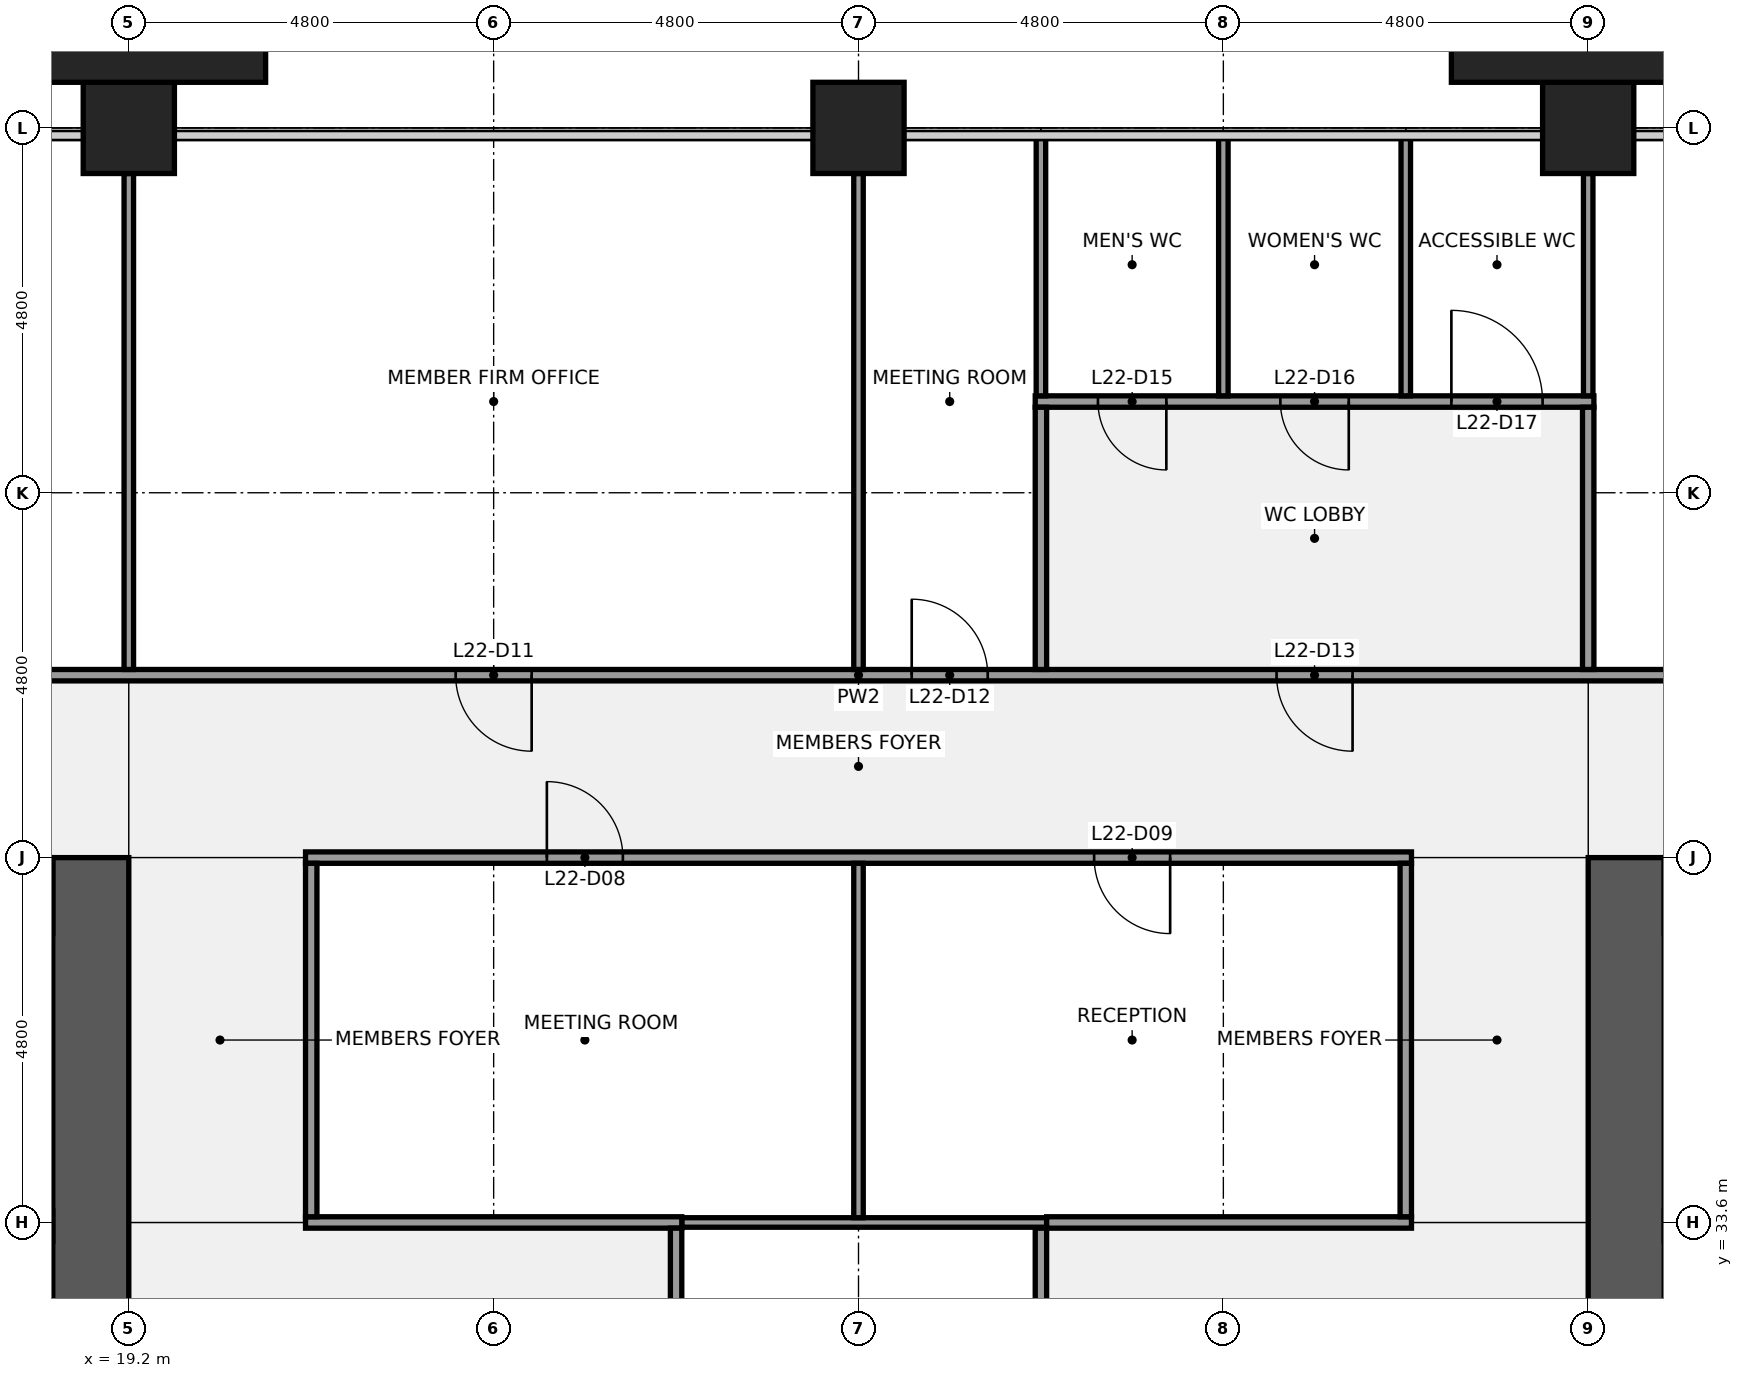
"""IFC4 building model, lengths in metres.
Left out: names, types, materials, properties, quantities, classifications, styles, units other than length and angle.
Written with IfcOpenShell. Run it as: python <this file> out.ifc"""

import sys

from ifc_helpers import new_model, si_unit, direction, frame, frame_2d, origin, origin_2d, place, context, subcontext, project, spatial, rectangle, extrude, element, fill, save


model = new_model("IFC4")
c1 = context("Model", 3, precision=1e-05, world=origin(), true_north=direction((0.0, 1.0)))
c2 = subcontext(c1, "Body", "Model", "MODEL_VIEW")
j1 = project(units=[si_unit("LENGTHUNIT", "METRE"), si_unit("PLANEANGLEUNIT", "RADIAN")], contexts=[c1])
p1 = place(None, origin())
s1 = spatial("IfcSite", under=j1, at=p1, CompositionType="ELEMENT")
p2 = place(p1, origin())
s2 = spatial("IfcBuilding", under=s1, at=p2, CompositionType="ELEMENT")
p3 = place(p2, frame((0.0, 0.0, 108.1)))
s3 = spatial("IfcBuildingStorey", under=s2, at=p3, CompositionType="ELEMENT", Elevation=108.1)
for number, where, z_axis, x_axis in (
    (1, (19.2, 48.0, 0.0), (0.0, 0.0, 1.0), (1.0, 0.0, 0.0)),
    (2, (28.8, 48.0, 0.0), (0.0, 0.0, 1.0), (1.0, 0.0, 0.0)),
    (3, (38.4, 48.0, 0.0), (0.0, 0.0, 1.0), (1.0, 0.0, 0.0)),
):
    element("IfcColumn", number, at=place(p3, frame(where, z_axis=z_axis, x_axis=x_axis)), inside=s3, PredefinedType="COLUMN", context=c2, shape_type="SweptSolid", body=[
        extrude(rectangle(XDim=1.2, YDim=1.2, at=origin_2d()), origin(), (0.0, 0.0, 1.0), 4.0),
    ])
p4 = place(p3, frame((18.7, 38.4, 0.0), z_axis=(0.0, 0.0, 1.0), x_axis=(0.0, -1.0, 0.0)))
e4 = element("IfcWall", 4, at=p4, inside=s3, PredefinedType="SHEAR", context=c2, shape_type="SweptSolid", body=[
    extrude(rectangle(XDim=28.8, YDim=1.0, at=frame_2d((14.4, 0.0))), origin(), (0.0, 0.0, 1.0), 3.84),
])
p5 = place(p4, frame((18.3, 0.0, 0.0)))
e5 = element("IfcOpeningElement", 5, at=p5, cuts=e4, PredefinedType="OPENING", context=c2, shape_type="SweptSolid", body=[
    extrude(rectangle(XDim=1.8, YDim=2.1, at=frame_2d((0.9, 1.05))), frame((0.0, 0.51, 0.0), z_axis=(0.0, -1.0, 0.0), x_axis=(1.0, 0.0, 0.0)), (0.0, 0.0, 1.0), 1.02),
])
p6 = place(p4, frame((8.7, 0.0, 0.0)))
e6 = element("IfcOpeningElement", 6, at=p6, cuts=e4, PredefinedType="OPENING", context=c2, shape_type="SweptSolid", body=[
    extrude(rectangle(XDim=1.8, YDim=2.1, at=frame_2d((0.9, 1.05))), frame((0.0, 0.51, 0.0), z_axis=(0.0, -1.0, 0.0), x_axis=(1.0, 0.0, 0.0)), (0.0, 0.0, 1.0), 1.02),
])
p7 = place(p3, frame((1.0, 33.55, 0.0), z_axis=(0.0, 0.0, 1.0), x_axis=(1.0, 0.0, 0.0)))
e7 = element("IfcWall", 7, at=p7, inside=s3, PredefinedType="SHEAR", context=c2, shape_type="SweptSolid", body=[
    extrude(rectangle(XDim=17.2, YDim=0.4, at=frame_2d((8.6, 0.0))), origin(), (0.0, 0.0, 1.0), 3.84),
])
p8 = place(p3, frame((38.9, 9.6, 0.0), z_axis=(0.0, 0.0, 1.0), x_axis=(0.0, 1.0, 0.0)))
e8 = element("IfcWall", 8, at=p8, inside=s3, PredefinedType="SHEAR", context=c2, shape_type="SweptSolid", body=[
    extrude(rectangle(XDim=28.8, YDim=1.0, at=frame_2d((14.4, 0.0))), origin(), (0.0, 0.0, 1.0), 3.84),
])
p9 = place(p8, frame((8.7, 0.0, 0.0)))
e9 = element("IfcOpeningElement", 9, at=p9, cuts=e8, PredefinedType="OPENING", context=c2, shape_type="SweptSolid", body=[
    extrude(rectangle(XDim=1.8, YDim=2.1, at=frame_2d((0.9, 1.05))), frame((0.0, 0.51, 0.0), z_axis=(0.0, -1.0, 0.0), x_axis=(1.0, 0.0, 0.0)), (0.0, 0.0, 1.0), 1.02),
])
p10 = place(p8, frame((18.3, 0.0, 0.0)))
e10 = element("IfcOpeningElement", 10, at=p10, cuts=e8, PredefinedType="OPENING", context=c2, shape_type="SweptSolid", body=[
    extrude(rectangle(XDim=1.8, YDim=2.1, at=frame_2d((0.9, 1.05))), frame((0.0, 0.51, 0.0), z_axis=(0.0, -1.0, 0.0), x_axis=(1.0, 0.0, 0.0)), (0.0, 0.0, 1.0), 1.02),
])
p11 = place(p3, frame((26.475, 33.6, 0.0), z_axis=(0.0, 0.0, 1.0), x_axis=(1.0, 0.0, 0.0)))
e11 = element("IfcWall", 11, at=p11, inside=s3, PredefinedType="PARTITIONING", context=c2, shape_type="SweptSolid", body=[
    extrude(rectangle(XDim=4.8, YDim=0.125, at=frame_2d((2.4, 0.0))), origin(), (0.0, 0.0, 1.0), 2.936),
])
p12 = place(p3, frame((21.525, 33.6, 0.0), z_axis=(0.0, 0.0, 1.0), x_axis=(1.0, 0.0, 0.0)))
e12 = element("IfcWall", 12, at=p12, inside=s3, PredefinedType="PARTITIONING", context=c2, shape_type="SweptSolid", body=[
    extrude(rectangle(XDim=4.95, YDim=0.15, at=frame_2d((2.475, 0.0))), origin(), (0.0, 0.0, 1.0), 2.936),
])
p13 = place(p3, frame((31.275, 33.6, 0.0), z_axis=(0.0, 0.0, 1.0), x_axis=(1.0, 0.0, 0.0)))
e13 = element("IfcWall", 13, at=p13, inside=s3, PredefinedType="PARTITIONING", context=c2, shape_type="SweptSolid", body=[
    extrude(rectangle(XDim=4.8, YDim=0.15, at=frame_2d((2.4, 0.0))), origin(), (0.0, 0.0, 1.0), 2.936),
])
p14 = place(p3, frame((21.525, 38.4, 0.0), z_axis=(0.0, 0.0, 1.0), x_axis=(1.0, 0.0, 0.0)))
e14 = element("IfcWall", 14, at=p14, inside=s3, PredefinedType="PARTITIONING", context=c2, shape_type="SweptSolid", body=[
    extrude(rectangle(XDim=14.55, YDim=0.15, at=frame_2d((7.275, 0.0))), origin(), (0.0, 0.0, 1.0), 2.936),
])
p15 = place(p14, frame((3.175, 0.0, 0.0)))
e15 = element("IfcOpeningElement", 15, at=p15, cuts=e14, PredefinedType="OPENING", context=c2, shape_type="SweptSolid", body=[
    extrude(rectangle(XDim=1.0, YDim=2.1, at=frame_2d((0.5, 1.05))), frame((0.0, 0.085, 0.0), z_axis=(0.0, -1.0, 0.0), x_axis=(1.0, 0.0, 0.0)), (0.0, 0.0, 1.0), 0.17),
])
p16 = place(p14, frame((10.375, 0.0, 0.0)))
e16 = element("IfcOpeningElement", 16, at=p16, cuts=e14, PredefinedType="OPENING", context=c2, shape_type="SweptSolid", body=[
    extrude(rectangle(XDim=1.0, YDim=2.1, at=frame_2d((0.5, 1.05))), frame((0.0, 0.085, 0.0), z_axis=(0.0, -1.0, 0.0), x_axis=(1.0, 0.0, 0.0)), (0.0, 0.0, 1.0), 0.17),
])
p17 = place(p3, frame((9.525, 40.8, 0.0), z_axis=(0.0, 0.0, 1.0), x_axis=(1.0, 0.0, 0.0)))
e17 = element("IfcWall", 17, at=p17, inside=s3, PredefinedType="PARTITIONING", context=c2, shape_type="SweptSolid", body=[
    extrude(rectangle(XDim=38.55, YDim=0.15, at=frame_2d((19.275, 0.0))), origin(), (0.0, 0.0, 1.0), 2.936),
])
p18 = place(p17, frame((4.375, 0.0, 0.0)))
e18 = element("IfcOpeningElement", 18, at=p18, cuts=e17, PredefinedType="OPENING", context=c2, shape_type="SweptSolid", body=[
    extrude(rectangle(XDim=1.0, YDim=2.1, at=frame_2d((0.5, 1.05))), frame((0.0, 0.085, 0.0), z_axis=(0.0, -1.0, 0.0), x_axis=(1.0, 0.0, 0.0)), (0.0, 0.0, 1.0), 0.17),
])
p19 = place(p17, frame((13.975, 0.0, 0.0)))
e19 = element("IfcOpeningElement", 19, at=p19, cuts=e17, PredefinedType="OPENING", context=c2, shape_type="SweptSolid", body=[
    extrude(rectangle(XDim=1.0, YDim=2.1, at=frame_2d((0.5, 1.05))), frame((0.0, 0.085, 0.0), z_axis=(0.0, -1.0, 0.0), x_axis=(1.0, 0.0, 0.0)), (0.0, 0.0, 1.0), 0.17),
])
p20 = place(p17, frame((19.975, 0.0, 0.0)))
e20 = element("IfcOpeningElement", 20, at=p20, cuts=e17, PredefinedType="OPENING", context=c2, shape_type="SweptSolid", body=[
    extrude(rectangle(XDim=1.0, YDim=2.1, at=frame_2d((0.5, 1.05))), frame((0.0, 0.085, 0.0), z_axis=(0.0, -1.0, 0.0), x_axis=(1.0, 0.0, 0.0)), (0.0, 0.0, 1.0), 0.17),
])
p21 = place(p17, frame((24.775, 0.0, 0.0)))
e21 = element("IfcOpeningElement", 21, at=p21, cuts=e17, PredefinedType="OPENING", context=c2, shape_type="SweptSolid", body=[
    extrude(rectangle(XDim=1.0, YDim=2.1, at=frame_2d((0.5, 1.05))), frame((0.0, 0.085, 0.0), z_axis=(0.0, -1.0, 0.0), x_axis=(1.0, 0.0, 0.0)), (0.0, 0.0, 1.0), 0.17),
])
p22 = place(p17, frame((33.175, 0.0, 0.0)))
e22 = element("IfcOpeningElement", 22, at=p22, cuts=e17, PredefinedType="OPENING", context=c2, shape_type="SweptSolid", body=[
    extrude(rectangle(XDim=1.0, YDim=2.1, at=frame_2d((0.5, 1.05))), frame((0.0, 0.085, 0.0), z_axis=(0.0, -1.0, 0.0), x_axis=(1.0, 0.0, 0.0)), (0.0, 0.0, 1.0), 0.17),
])
p23 = place(p3, frame((31.125, 44.4, 0.0), z_axis=(0.0, 0.0, 1.0), x_axis=(1.0, 0.0, 0.0)))
e23 = element("IfcWall", 23, at=p23, inside=s3, PredefinedType="PARTITIONING", context=c2, shape_type="SweptSolid", body=[
    extrude(rectangle(XDim=7.35, YDim=0.15, at=frame_2d((3.675, 0.0))), origin(), (0.0, 0.0, 1.0), 2.936),
])
p24 = place(p23, frame((0.825, 0.0, 0.0)))
e24 = element("IfcOpeningElement", 24, at=p24, cuts=e23, PredefinedType="OPENING", context=c2, shape_type="SweptSolid", body=[
    extrude(rectangle(XDim=0.9, YDim=2.1, at=frame_2d((0.45, 1.05))), frame((0.0, 0.085, 0.0), z_axis=(0.0, -1.0, 0.0), x_axis=(1.0, 0.0, 0.0)), (0.0, 0.0, 1.0), 0.17),
])
p25 = place(p23, frame((3.225, 0.0, 0.0)))
e25 = element("IfcOpeningElement", 25, at=p25, cuts=e23, PredefinedType="OPENING", context=c2, shape_type="SweptSolid", body=[
    extrude(rectangle(XDim=0.9, YDim=2.1, at=frame_2d((0.45, 1.05))), frame((0.0, 0.085, 0.0), z_axis=(0.0, -1.0, 0.0), x_axis=(1.0, 0.0, 0.0)), (0.0, 0.0, 1.0), 0.17),
])
p26 = place(p23, frame((5.475, 0.0, 0.0)))
e26 = element("IfcOpeningElement", 26, at=p26, cuts=e23, PredefinedType="OPENING", context=c2, shape_type="SweptSolid", body=[
    extrude(rectangle(XDim=1.2, YDim=2.1, at=frame_2d((0.6, 1.05))), frame((0.0, 0.085, 0.0), z_axis=(0.0, -1.0, 0.0), x_axis=(1.0, 0.0, 0.0)), (0.0, 0.0, 1.0), 0.17),
])
p27 = place(p3, frame((19.2, 40.875, 0.0), z_axis=(0.0, 0.0, 1.0), x_axis=(0.0, 1.0, 0.0)))
e27 = element("IfcWall", 27, at=p27, inside=s3, PredefinedType="PARTITIONING", context=c2, shape_type="SweptSolid", body=[
    extrude(rectangle(XDim=6.525, YDim=0.125, at=frame_2d((3.262, 0.0))), origin(), (0.0, 0.0, 1.0), 2.936),
])
p28 = place(p3, frame((21.6, 33.675, 0.0), z_axis=(0.0, 0.0, 1.0), x_axis=(0.0, 1.0, 0.0)))
e28 = element("IfcWall", 28, at=p28, inside=s3, PredefinedType="PARTITIONING", context=c2, shape_type="SweptSolid", body=[
    extrude(rectangle(XDim=4.65, YDim=0.15, at=frame_2d((2.325, 0.0))), origin(), (0.0, 0.0, 1.0), 2.936),
])
p29 = place(p3, frame((26.4, 20.475, 0.0), z_axis=(0.0, 0.0, 1.0), x_axis=(0.0, 1.0, 0.0)))
e29 = element("IfcWall", 29, at=p29, inside=s3, PredefinedType="PARTITIONING", context=c2, shape_type="SweptSolid", body=[
    extrude(rectangle(XDim=13.05, YDim=0.15, at=frame_2d((6.525, 0.0))), origin(), (0.0, 0.0, 1.0), 2.936),
])
p30 = place(p29, frame((6.025, 0.0, 0.0)))
e30 = element("IfcOpeningElement", 30, at=p30, cuts=e29, PredefinedType="OPENING", context=c2, shape_type="SweptSolid", body=[
    extrude(rectangle(XDim=1.0, YDim=2.1, at=frame_2d((0.5, 1.05))), frame((0.0, 0.085, 0.0), z_axis=(0.0, -1.0, 0.0), x_axis=(1.0, 0.0, 0.0)), (0.0, 0.0, 1.0), 0.17),
])
p31 = place(p3, frame((28.8, 33.663, 0.0), z_axis=(0.0, 0.0, 1.0), x_axis=(0.0, 1.0, 0.0)))
e31 = element("IfcWall", 31, at=p31, inside=s3, PredefinedType="PARTITIONING", context=c2, shape_type="SweptSolid", body=[
    extrude(rectangle(XDim=4.662, YDim=0.125, at=frame_2d((2.331, 0.0))), origin(), (0.0, 0.0, 1.0), 2.936),
])
p32 = place(p3, frame((28.8, 40.875, 0.0), z_axis=(0.0, 0.0, 1.0), x_axis=(0.0, 1.0, 0.0)))
e32 = element("IfcWall", 32, at=p32, inside=s3, PredefinedType="PARTITIONING", context=c2, shape_type="SweptSolid", body=[
    extrude(rectangle(XDim=6.525, YDim=0.125, at=frame_2d((3.262, 0.0))), origin(), (0.0, 0.0, 1.0), 2.936),
])
p33 = place(p3, frame((31.2, 44.475, 0.0), z_axis=(0.0, 0.0, 1.0), x_axis=(0.0, 1.0, 0.0)))
e33 = element("IfcWall", 33, at=p33, inside=s3, PredefinedType="PARTITIONING", context=c2, shape_type="SweptSolid", body=[
    extrude(rectangle(XDim=3.425, YDim=0.125, at=frame_2d((1.712, 0.0))), origin(), (0.0, 0.0, 1.0), 2.936),
])
p34 = place(p3, frame((31.2, 20.475, 0.0), z_axis=(0.0, 0.0, 1.0), x_axis=(0.0, 1.0, 0.0)))
e34 = element("IfcWall", 34, at=p34, inside=s3, PredefinedType="PARTITIONING", context=c2, shape_type="SweptSolid", body=[
    extrude(rectangle(XDim=13.05, YDim=0.15, at=frame_2d((6.525, 0.0))), origin(), (0.0, 0.0, 1.0), 2.936),
])
p35 = place(p3, frame((31.2, 40.875, 0.0), z_axis=(0.0, 0.0, 1.0), x_axis=(0.0, 1.0, 0.0)))
e35 = element("IfcWall", 35, at=p35, inside=s3, PredefinedType="PARTITIONING", context=c2, shape_type="SweptSolid", body=[
    extrude(rectangle(XDim=3.45, YDim=0.15, at=frame_2d((1.725, 0.0))), origin(), (0.0, 0.0, 1.0), 2.936),
])
for number, where, z_axis, x_axis in (
    (36, (33.6, 44.475, 0.0), (0.0, 0.0, 1.0), (0.0, 1.0, 0.0)),
    (37, (36.0, 44.475, 0.0), (0.0, 0.0, 1.0), (0.0, 1.0, 0.0)),
):
    element("IfcWall", number, at=place(p3, frame(where, z_axis=z_axis, x_axis=x_axis)), inside=s3, PredefinedType="PARTITIONING", context=c2, shape_type="SweptSolid", body=[
        extrude(rectangle(XDim=3.425, YDim=0.125, at=frame_2d((1.712, 0.0))), origin(), (0.0, 0.0, 1.0), 2.936),
    ])
p36 = place(p3, frame((36.0, 33.675, 0.0), z_axis=(0.0, 0.0, 1.0), x_axis=(0.0, 1.0, 0.0)))
e38 = element("IfcWall", 38, at=p36, inside=s3, PredefinedType="PARTITIONING", context=c2, shape_type="SweptSolid", body=[
    extrude(rectangle(XDim=4.65, YDim=0.15, at=frame_2d((2.325, 0.0))), origin(), (0.0, 0.0, 1.0), 2.936),
])
p37 = place(p3, frame((38.4, 44.475, 0.0), z_axis=(0.0, 0.0, 1.0), x_axis=(0.0, 1.0, 0.0)))
e39 = element("IfcWall", 39, at=p37, inside=s3, PredefinedType="PARTITIONING", context=c2, shape_type="SweptSolid", body=[
    extrude(rectangle(XDim=2.925, YDim=0.125, at=frame_2d((1.462, 0.0))), origin(), (0.0, 0.0, 1.0), 2.936),
])
p38 = place(p3, frame((38.4, 40.875, 0.0), z_axis=(0.0, 0.0, 1.0), x_axis=(0.0, 1.0, 0.0)))
e40 = element("IfcWall", 40, at=p38, inside=s3, PredefinedType="PARTITIONING", context=c2, shape_type="SweptSolid", body=[
    extrude(rectangle(XDim=3.45, YDim=0.15, at=frame_2d((1.725, 0.0))), origin(), (0.0, 0.0, 1.0), 2.936),
])
for number, where, z_axis, x_axis in (
    (41, (19.2, 49.05, 0.0), (0.0, 0.0, 1.0), (1.0, 0.0, 0.0)),
    (42, (38.4, 49.05, 0.0), (0.0, 0.0, 1.0), (1.0, 0.0, 0.0)),
):
    element("IfcColumn", number, at=place(p3, frame(where, z_axis=z_axis, x_axis=x_axis)), inside=s3, PredefinedType="PILASTER", context=c2, shape_type="SweptSolid", body=[
        extrude(rectangle(XDim=3.6, YDim=0.9, at=origin_2d()), origin(), (0.0, 0.0, 1.0), 4.0),
    ])
p39 = place(p15, origin())
e43 = element("IfcDoor", 43, at=p39, inside=s3, OperationType="SINGLE_SWING_LEFT", PredefinedType="DOOR", context=c2, shape_type="SweptSolid", body=[
    extrude(rectangle(XDim=1.0, YDim=2.1, at=frame_2d((0.5, 1.05))), frame((0.0, 0.025, 0.0), z_axis=(0.0, -1.0, 0.0), x_axis=(1.0, 0.0, 0.0)), (0.0, 0.0, 1.0), 0.05),
])
fill(e15, e43)
p40 = place(p16, origin())
e44 = element("IfcDoor", 44, at=p40, inside=s3, OperationType="SINGLE_SWING_RIGHT", PredefinedType="DOOR", context=c2, shape_type="SweptSolid", body=[
    extrude(rectangle(XDim=1.0, YDim=2.1, at=frame_2d((0.5, 1.05))), frame((0.0, 0.025, 0.0), z_axis=(0.0, -1.0, 0.0), x_axis=(1.0, 0.0, 0.0)), (0.0, 0.0, 1.0), 0.05),
])
fill(e16, e44)
p41 = place(p19, origin())
e45 = element("IfcDoor", 45, at=p41, inside=s3, OperationType="SINGLE_SWING_RIGHT", PredefinedType="DOOR", context=c2, shape_type="SweptSolid", body=[
    extrude(rectangle(XDim=1.0, YDim=2.1, at=frame_2d((0.5, 1.05))), frame((0.0, 0.025, 0.0), z_axis=(0.0, -1.0, 0.0), x_axis=(1.0, 0.0, 0.0)), (0.0, 0.0, 1.0), 0.05),
])
fill(e19, e45)
p42 = place(p20, origin())
e46 = element("IfcDoor", 46, at=p42, inside=s3, OperationType="SINGLE_SWING_LEFT", PredefinedType="DOOR", context=c2, shape_type="SweptSolid", body=[
    extrude(rectangle(XDim=1.0, YDim=2.1, at=frame_2d((0.5, 1.05))), frame((0.0, 0.025, 0.0), z_axis=(0.0, -1.0, 0.0), x_axis=(1.0, 0.0, 0.0)), (0.0, 0.0, 1.0), 0.05),
])
fill(e20, e46)
p43 = place(p21, origin())
e47 = element("IfcDoor", 47, at=p43, inside=s3, OperationType="SINGLE_SWING_RIGHT", PredefinedType="DOOR", context=c2, shape_type="SweptSolid", body=[
    extrude(rectangle(XDim=1.0, YDim=2.1, at=frame_2d((0.5, 1.05))), frame((0.0, 0.025, 0.0), z_axis=(0.0, -1.0, 0.0), x_axis=(1.0, 0.0, 0.0)), (0.0, 0.0, 1.0), 0.05),
])
fill(e21, e47)
p44 = place(p24, origin())
e48 = element("IfcDoor", 48, at=p44, inside=s3, OperationType="SINGLE_SWING_RIGHT", PredefinedType="DOOR", context=c2, shape_type="SweptSolid", body=[
    extrude(rectangle(XDim=0.9, YDim=2.1, at=frame_2d((0.45, 1.05))), frame((0.0, 0.025, 0.0), z_axis=(0.0, -1.0, 0.0), x_axis=(1.0, 0.0, 0.0)), (0.0, 0.0, 1.0), 0.05),
])
fill(e24, e48)
p45 = place(p25, origin())
e49 = element("IfcDoor", 49, at=p45, inside=s3, OperationType="SINGLE_SWING_RIGHT", PredefinedType="DOOR", context=c2, shape_type="SweptSolid", body=[
    extrude(rectangle(XDim=0.9, YDim=2.1, at=frame_2d((0.45, 1.05))), frame((0.0, 0.025, 0.0), z_axis=(0.0, -1.0, 0.0), x_axis=(1.0, 0.0, 0.0)), (0.0, 0.0, 1.0), 0.05),
])
fill(e25, e49)
p46 = place(p26, origin())
e50 = element("IfcDoor", 50, at=p46, inside=s3, OperationType="SINGLE_SWING_LEFT", PredefinedType="DOOR", context=c2, shape_type="SweptSolid", body=[
    extrude(rectangle(XDim=1.2, YDim=2.1, at=frame_2d((0.6, 1.05))), frame((0.0, 0.025, 0.0), z_axis=(0.0, -1.0, 0.0), x_axis=(1.0, 0.0, 0.0)), (0.0, 0.0, 1.0), 0.05),
])
fill(e26, e50)
save(model, sys.argv[1])
